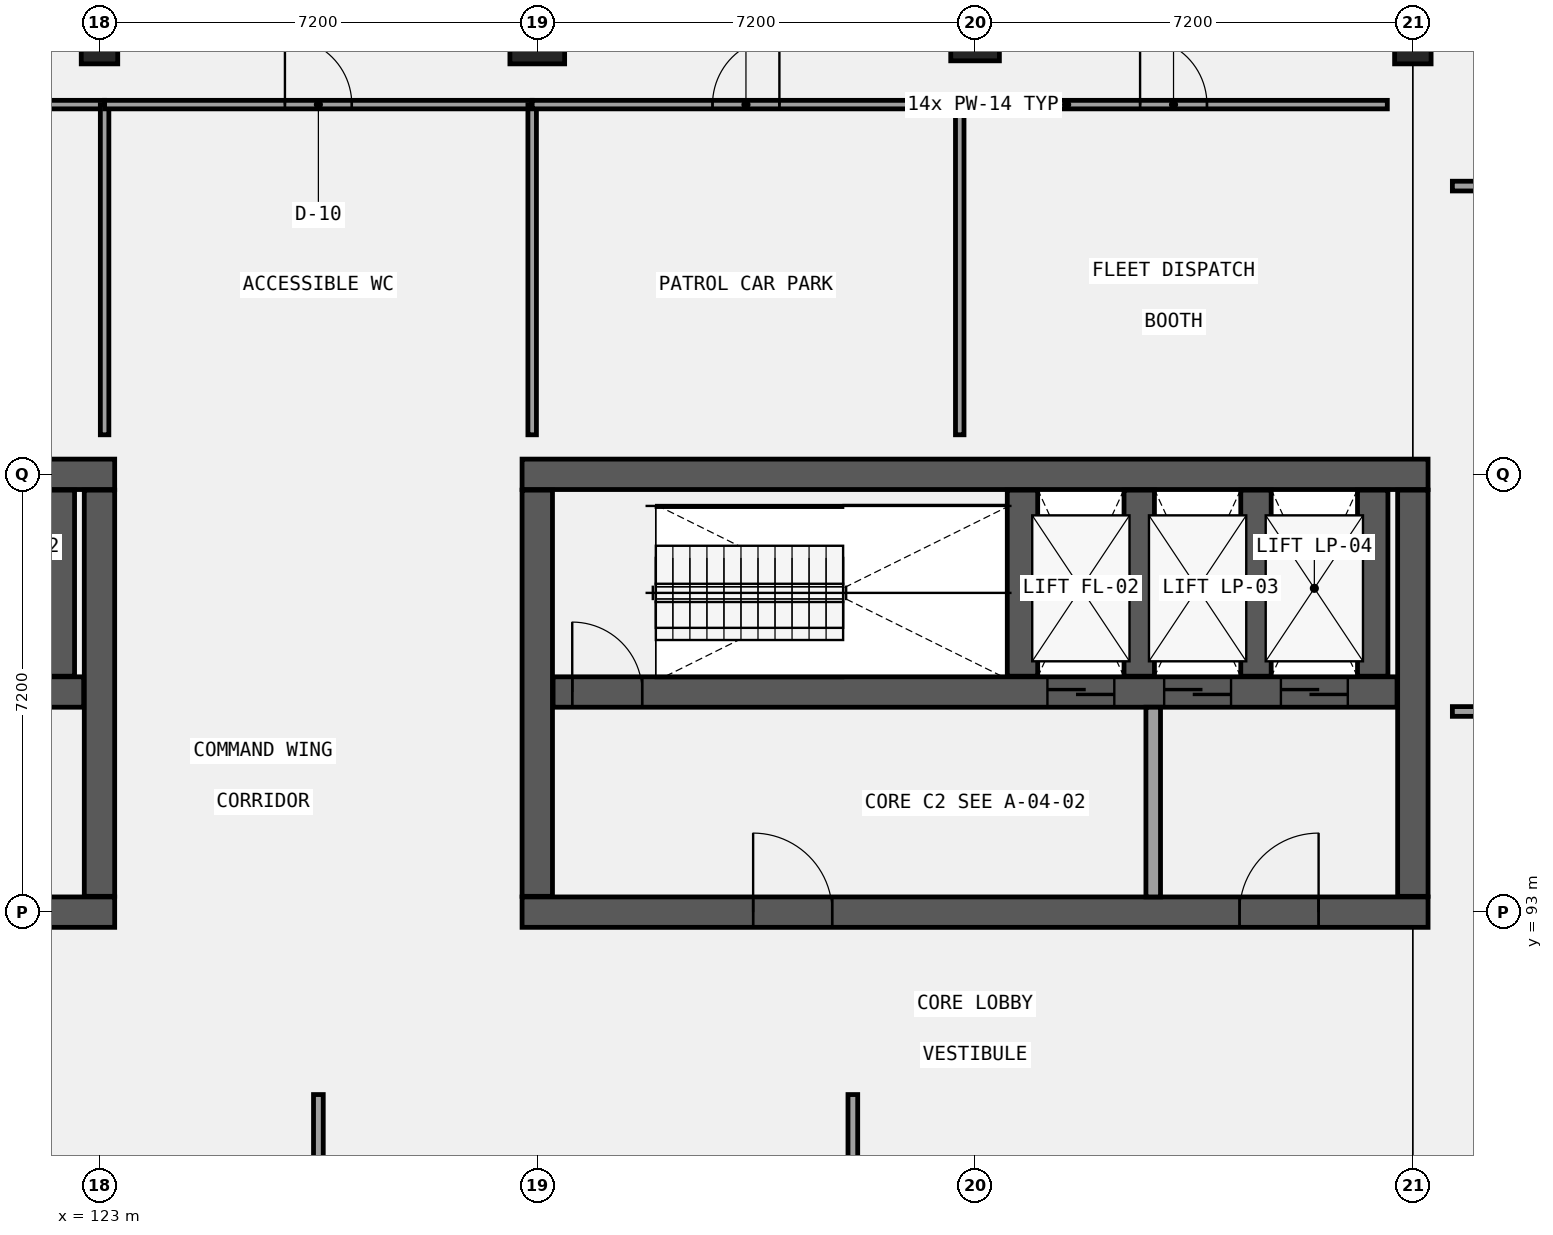
"""IFC4 building model, lengths in metres.
Left out: names, types, materials, properties, quantities, classifications, styles, units other than length and angle.
Written with IfcOpenShell. Run it as: python <this file> out.ifc"""

import sys

from ifc_helpers import new_model, si_unit, direction, frame, frame_2d, origin, origin_2d, place, context, subcontext, project, spatial, rectangle, extrude, element, fill, save


model = new_model("IFC4")
c1 = context("Model", 3, precision=1e-05, world=origin(), true_north=direction((0.0, 1.0)))
c2 = subcontext(c1, "Body", "Model", "MODEL_VIEW")
j1 = project(units=[si_unit("LENGTHUNIT", "METRE"), si_unit("PLANEANGLEUNIT", "RADIAN")], contexts=[c1])
p1 = place(None, origin())
s1 = spatial("IfcSite", under=j1, at=p1, CompositionType="ELEMENT")
p2 = place(p1, origin())
s2 = spatial("IfcBuilding", under=s1, at=p2, CompositionType="ELEMENT")
p3 = place(p2, frame((0.0, 0.0, -4.2)))
s3 = spatial("IfcBuildingStorey", under=s2, at=p3, CompositionType="ELEMENT", Elevation=-4.2)
p4 = place(p3, frame((108.35, 100.2, 0.0), z_axis=(0.0, 0.0, 1.0), x_axis=(1.0, 0.0, 0.0)))
e1 = element("IfcWall", 1, at=p4, inside=s3, PredefinedType="SHEAR", context=c2, shape_type="SweptSolid", body=[
    extrude(rectangle(XDim=14.9, YDim=0.5, at=frame_2d((7.45, 0.0))), origin(), (0.0, 0.0, 1.0), 4.2),
])
p5 = place(p3, frame((108.35, 93.0, 0.0), z_axis=(0.0, 0.0, 1.0), x_axis=(1.0, 0.0, 0.0)))
e2 = element("IfcWall", 2, at=p5, inside=s3, PredefinedType="SHEAR", context=c2, shape_type="SweptSolid", body=[
    extrude(rectangle(XDim=14.9, YDim=0.5, at=frame_2d((7.45, 0.0))), origin(), (0.0, 0.0, 1.0), 4.2),
])
p6 = place(p5, frame((3.8, 0.0, 0.0)))
e3 = element("IfcOpeningElement", 3, at=p6, cuts=e2, PredefinedType="OPENING", context=c2, shape_type="SweptSolid", body=[
    extrude(rectangle(XDim=1.3, YDim=2.2, at=frame_2d((0.65, 1.1))), frame((0.0, 0.26, 0.0), z_axis=(0.0, -1.0, 0.0), x_axis=(1.0, 0.0, 0.0)), (0.0, 0.0, 1.0), 0.52),
])
p7 = place(p5, frame((11.8, 0.0, 0.0)))
e4 = element("IfcOpeningElement", 4, at=p7, cuts=e2, PredefinedType="OPENING", context=c2, shape_type="SweptSolid", body=[
    extrude(rectangle(XDim=1.3, YDim=2.2, at=frame_2d((0.65, 1.1))), frame((0.0, 0.26, 0.0), z_axis=(0.0, -1.0, 0.0), x_axis=(1.0, 0.0, 0.0)), (0.0, 0.0, 1.0), 0.52),
])
p8 = place(p3, frame((123.0, 93.26, 0.0), z_axis=(0.0, 0.0, 1.0), x_axis=(0.0, 1.0, 0.0)))
e5 = element("IfcWall", 5, at=p8, inside=s3, PredefinedType="SHEAR", context=c2, shape_type="SweptSolid", body=[
    extrude(rectangle(XDim=6.68, YDim=0.5, at=frame_2d((3.34, 0.0))), origin(), (0.0, 0.0, 1.0), 4.2),
])
p9 = place(p3, frame((108.86, 96.62, 0.0), z_axis=(0.0, 0.0, 1.0), x_axis=(1.0, 0.0, 0.0)))
e6 = element("IfcWall", 6, at=p9, inside=s3, PredefinedType="SHEAR", context=c2, shape_type="SweptSolid", body=[
    extrude(rectangle(XDim=13.88, YDim=0.5, at=frame_2d((6.94, 0.0))), origin(), (0.0, 0.0, 1.0), 4.2),
])
p10 = place(p9, frame((8.13, 0.0, 0.0)))
e7 = element("IfcOpeningElement", 7, at=p10, cuts=e6, PredefinedType="OPENING", context=c2, shape_type="SweptSolid", body=[
    extrude(rectangle(XDim=1.1, YDim=2.15, at=frame_2d((0.55, 1.075))), frame((0.0, 0.26, 0.0), z_axis=(0.0, -1.0, 0.0), x_axis=(1.0, 0.0, 0.0)), (0.0, 0.0, 1.0), 0.52),
])
p11 = place(p9, frame((10.05, 0.0, 0.0)))
e8 = element("IfcOpeningElement", 8, at=p11, cuts=e6, PredefinedType="OPENING", context=c2, shape_type="SweptSolid", body=[
    extrude(rectangle(XDim=1.1, YDim=2.15, at=frame_2d((0.55, 1.075))), frame((0.0, 0.26, 0.0), z_axis=(0.0, -1.0, 0.0), x_axis=(1.0, 0.0, 0.0)), (0.0, 0.0, 1.0), 0.52),
])
p12 = place(p9, frame((11.97, 0.0, 0.0)))
e9 = element("IfcOpeningElement", 9, at=p12, cuts=e6, PredefinedType="OPENING", context=c2, shape_type="SweptSolid", body=[
    extrude(rectangle(XDim=1.1, YDim=2.15, at=frame_2d((0.55, 1.075))), frame((0.0, 0.26, 0.0), z_axis=(0.0, -1.0, 0.0), x_axis=(1.0, 0.0, 0.0)), (0.0, 0.0, 1.0), 0.52),
])
p13 = place(p9, frame((0.315, 0.0, 0.0)))
e10 = element("IfcOpeningElement", 10, at=p13, cuts=e6, PredefinedType="OPENING", context=c2, shape_type="SweptSolid", body=[
    extrude(rectangle(XDim=1.15, YDim=2.15, at=frame_2d((0.575, 1.075))), frame((0.0, 0.26, 0.0), z_axis=(0.0, -1.0, 0.0), x_axis=(1.0, 0.0, 0.0)), (0.0, 0.0, 1.0), 0.52),
])
p14 = place(p3, frame((122.34, 96.88, 0.0), z_axis=(0.0, 0.0, 1.0), x_axis=(0.0, 1.0, 0.0)))
e11 = element("IfcWall", 11, at=p14, inside=s3, PredefinedType="SHEAR", context=c2, shape_type="SweptSolid", body=[
    extrude(rectangle(XDim=3.06, YDim=0.5, at=frame_2d((1.53, 0.0))), origin(), (0.0, 0.0, 1.0), 4.2),
])
p15 = place(p3, frame((129.95, 100.2, 0.0), z_axis=(0.0, 0.0, 1.0), x_axis=(1.0, 0.0, 0.0)))
e12 = element("IfcWall", 12, at=p15, inside=s3, PredefinedType="SHEAR", context=c2, shape_type="SweptSolid", body=[
    extrude(rectangle(XDim=14.9, YDim=0.5, at=frame_2d((7.45, 0.0))), origin(), (0.0, 0.0, 1.0), 4.2),
])
p16 = place(p3, frame((129.95, 93.0, 0.0), z_axis=(0.0, 0.0, 1.0), x_axis=(1.0, 0.0, 0.0)))
e13 = element("IfcWall", 13, at=p16, inside=s3, PredefinedType="SHEAR", context=c2, shape_type="SweptSolid", body=[
    extrude(rectangle(XDim=14.9, YDim=0.5, at=frame_2d((7.45, 0.0))), origin(), (0.0, 0.0, 1.0), 4.2),
])
p17 = place(p16, frame((3.8, 0.0, 0.0)))
e14 = element("IfcOpeningElement", 14, at=p17, cuts=e13, PredefinedType="OPENING", context=c2, shape_type="SweptSolid", body=[
    extrude(rectangle(XDim=1.3, YDim=2.2, at=frame_2d((0.65, 1.1))), frame((0.0, 0.26, 0.0), z_axis=(0.0, -1.0, 0.0), x_axis=(1.0, 0.0, 0.0)), (0.0, 0.0, 1.0), 0.52),
])
p18 = place(p16, frame((11.8, 0.0, 0.0)))
e15 = element("IfcOpeningElement", 15, at=p18, cuts=e13, PredefinedType="OPENING", context=c2, shape_type="SweptSolid", body=[
    extrude(rectangle(XDim=1.3, YDim=2.2, at=frame_2d((0.65, 1.1))), frame((0.0, 0.26, 0.0), z_axis=(0.0, -1.0, 0.0), x_axis=(1.0, 0.0, 0.0)), (0.0, 0.0, 1.0), 0.52),
])
for number, where, z_axis, x_axis in (
    (16, (130.2, 93.26, 0.0), (0.0, 0.0, 1.0), (0.0, 1.0, 0.0)),
    (17, (144.6, 93.26, 0.0), (0.0, 0.0, 1.0), (0.0, 1.0, 0.0)),
):
    element("IfcWall", number, at=place(p3, frame(where, z_axis=z_axis, x_axis=x_axis)), inside=s3, PredefinedType="SHEAR", context=c2, shape_type="SweptSolid", body=[
        extrude(rectangle(XDim=6.68, YDim=0.5, at=frame_2d((3.34, 0.0))), origin(), (0.0, 0.0, 1.0), 4.2),
    ])
p19 = place(p3, frame((130.46, 96.62, 0.0), z_axis=(0.0, 0.0, 1.0), x_axis=(1.0, 0.0, 0.0)))
e18 = element("IfcWall", 18, at=p19, inside=s3, PredefinedType="SHEAR", context=c2, shape_type="SweptSolid", body=[
    extrude(rectangle(XDim=13.88, YDim=0.5, at=frame_2d((6.94, 0.0))), origin(), (0.0, 0.0, 1.0), 4.2),
])
p20 = place(p19, frame((8.13, 0.0, 0.0)))
e19 = element("IfcOpeningElement", 19, at=p20, cuts=e18, PredefinedType="OPENING", context=c2, shape_type="SweptSolid", body=[
    extrude(rectangle(XDim=1.1, YDim=2.15, at=frame_2d((0.55, 1.075))), frame((0.0, 0.26, 0.0), z_axis=(0.0, -1.0, 0.0), x_axis=(1.0, 0.0, 0.0)), (0.0, 0.0, 1.0), 0.52),
])
p21 = place(p19, frame((10.05, 0.0, 0.0)))
e20 = element("IfcOpeningElement", 20, at=p21, cuts=e18, PredefinedType="OPENING", context=c2, shape_type="SweptSolid", body=[
    extrude(rectangle(XDim=1.1, YDim=2.15, at=frame_2d((0.55, 1.075))), frame((0.0, 0.26, 0.0), z_axis=(0.0, -1.0, 0.0), x_axis=(1.0, 0.0, 0.0)), (0.0, 0.0, 1.0), 0.52),
])
p22 = place(p19, frame((11.97, 0.0, 0.0)))
e21 = element("IfcOpeningElement", 21, at=p22, cuts=e18, PredefinedType="OPENING", context=c2, shape_type="SweptSolid", body=[
    extrude(rectangle(XDim=1.1, YDim=2.15, at=frame_2d((0.55, 1.075))), frame((0.0, 0.26, 0.0), z_axis=(0.0, -1.0, 0.0), x_axis=(1.0, 0.0, 0.0)), (0.0, 0.0, 1.0), 0.52),
])
p23 = place(p19, frame((0.315, 0.0, 0.0)))
e22 = element("IfcOpeningElement", 22, at=p23, cuts=e18, PredefinedType="OPENING", context=c2, shape_type="SweptSolid", body=[
    extrude(rectangle(XDim=1.15, YDim=2.15, at=frame_2d((0.575, 1.075))), frame((0.0, 0.26, 0.0), z_axis=(0.0, -1.0, 0.0), x_axis=(1.0, 0.0, 0.0)), (0.0, 0.0, 1.0), 0.52),
])
for number, where, z_axis, x_axis in (
    (23, (138.18, 96.88, 0.0), (0.0, 0.0, 1.0), (0.0, 1.0, 0.0)),
    (24, (140.1, 96.88, 0.0), (0.0, 0.0, 1.0), (0.0, 1.0, 0.0)),
    (25, (142.02, 96.88, 0.0), (0.0, 0.0, 1.0), (0.0, 1.0, 0.0)),
    (26, (143.94, 96.88, 0.0), (0.0, 0.0, 1.0), (0.0, 1.0, 0.0)),
):
    element("IfcWall", number, at=place(p3, frame(where, z_axis=z_axis, x_axis=x_axis)), inside=s3, PredefinedType="SHEAR", context=c2, shape_type="SweptSolid", body=[
        extrude(rectangle(XDim=3.06, YDim=0.5, at=frame_2d((1.53, 0.0))), origin(), (0.0, 0.0, 1.0), 4.2),
    ])
p24 = place(p3, frame((123.0, 107.4, 0.0), z_axis=(0.0, 0.0, 1.0), x_axis=(1.0, 0.0, 0.0)))
e27 = element("IfcColumn", 27, at=p24, inside=s3, PredefinedType="COLUMN", context=c2, shape_type="SweptSolid", body=[
    extrude(rectangle(XDim=0.6, YDim=0.9, at=origin_2d()), origin(), (0.0, 0.0, 1.0), 4.2),
])
p25 = place(p3, frame((130.2, 107.4, 0.0), z_axis=(0.0, 0.0, 1.0), x_axis=(1.0, 0.0, 0.0)))
e28 = element("IfcColumn", 28, at=p25, inside=s3, PredefinedType="COLUMN", context=c2, shape_type="SweptSolid", body=[
    extrude(rectangle(XDim=0.9, YDim=0.9, at=origin_2d()), origin(), (0.0, 0.0, 1.0), 4.2),
])
p26 = place(p3, frame((137.4, 107.4, 0.0), z_axis=(0.0, 0.0, 1.0), x_axis=(1.0, 0.0, 0.0)))
e29 = element("IfcColumn", 29, at=p26, inside=s3, PredefinedType="COLUMN", context=c2, shape_type="SweptSolid", body=[
    extrude(rectangle(XDim=0.8, YDim=0.8, at=origin_2d()), origin(), (0.0, 0.0, 1.0), 4.2),
])
p27 = place(p3, frame((144.6, 107.4, 0.0), z_axis=(0.0, 0.0, 1.0), x_axis=(1.0, 0.0, 0.0)))
e30 = element("IfcColumn", 30, at=p27, inside=s3, PredefinedType="COLUMN", context=c2, shape_type="SweptSolid", body=[
    extrude(rectangle(XDim=0.6, YDim=0.9, at=origin_2d()), origin(), (0.0, 0.0, 1.0), 4.2),
])
p28 = place(p3, frame((140.33, 93.25, 0.0), z_axis=(0.0, 0.0, 1.0), x_axis=(0.0, 1.0, 0.0)))
e31 = element("IfcWall", 31, at=p28, inside=s3, PredefinedType="SOLIDWALL", context=c2, shape_type="SweptSolid", body=[
    extrude(rectangle(XDim=3.12, YDim=0.24, at=frame_2d((1.56, 0.0))), origin(), (0.0, 0.0, 1.0), 3.85),
])
p29 = place(p3, frame((116.052, 106.28, 0.0), z_axis=(0.0, 0.0, 1.0), x_axis=(1.0, 0.0, 0.0)))
e32 = element("IfcWall", 32, at=p29, inside=s3, PredefinedType="PARTITIONING", context=c2, shape_type="SweptSolid", body=[
    extrude(rectangle(XDim=7.032, YDim=0.14, at=frame_2d((3.516, 0.0))), origin(), (0.0, 0.0, 1.0), 3.88),
])
p30 = place(p29, frame((2.996, 0.0, 0.0)))
e33 = element("IfcOpeningElement", 33, at=p30, cuts=e32, PredefinedType="OPENING", context=c2, shape_type="SweptSolid", body=[
    extrude(rectangle(XDim=1.04, YDim=2.35, at=frame_2d((0.52, 1.175))), frame((0.0, 0.08, 0.0), z_axis=(0.0, -1.0, 0.0), x_axis=(1.0, 0.0, 0.0)), (0.0, 0.0, 1.0), 0.16),
])
p31 = place(p3, frame((123.084, 100.85, 0.0), z_axis=(0.0, 0.0, 1.0), x_axis=(0.0, 1.0, 0.0)))
e34 = element("IfcWall", 34, at=p31, inside=s3, PredefinedType="PARTITIONING", context=c2, shape_type="SweptSolid", body=[
    extrude(rectangle(XDim=5.43, YDim=0.14, at=frame_2d((2.715, 0.0))), origin(), (0.0, 0.0, 1.0), 2.88),
])
p32 = place(p3, frame((123.084, 106.28, 0.0), z_axis=(0.0, 0.0, 1.0), x_axis=(1.0, 0.0, 0.0)))
e35 = element("IfcWall", 35, at=p32, inside=s3, PredefinedType="PARTITIONING", context=c2, shape_type="SweptSolid", body=[
    extrude(rectangle(XDim=7.032, YDim=0.14, at=frame_2d((3.516, 0.0))), origin(), (0.0, 0.0, 1.0), 3.88),
])
p33 = place(p32, frame((2.966, 0.0, 0.0)))
e36 = element("IfcOpeningElement", 36, at=p33, cuts=e35, PredefinedType="OPENING", context=c2, shape_type="SweptSolid", body=[
    extrude(rectangle(XDim=1.1, YDim=2.1, at=frame_2d((0.55, 1.05))), frame((0.0, 0.08, 0.0), z_axis=(0.0, -1.0, 0.0), x_axis=(1.0, 0.0, 0.0)), (0.0, 0.0, 1.0), 0.16),
])
p34 = place(p3, frame((130.116, 100.85, 0.0), z_axis=(0.0, 0.0, 1.0), x_axis=(0.0, 1.0, 0.0)))
e37 = element("IfcWall", 37, at=p34, inside=s3, PredefinedType="PARTITIONING", context=c2, shape_type="SweptSolid", body=[
    extrude(rectangle(XDim=5.43, YDim=0.14, at=frame_2d((2.715, 0.0))), origin(), (0.0, 0.0, 1.0), 3.33),
])
p35 = place(p3, frame((130.116, 106.28, 0.0), z_axis=(0.0, 0.0, 1.0), x_axis=(1.0, 0.0, 0.0)))
e38 = element("IfcWall", 38, at=p35, inside=s3, PredefinedType="PARTITIONING", context=c2, shape_type="SweptSolid", body=[
    extrude(rectangle(XDim=7.032, YDim=0.14, at=frame_2d((3.516, 0.0))), origin(), (0.0, 0.0, 1.0), 3.88),
])
p36 = place(p35, frame((2.966, 0.0, 0.0)))
e39 = element("IfcOpeningElement", 39, at=p36, cuts=e38, PredefinedType="OPENING", context=c2, shape_type="SweptSolid", body=[
    extrude(rectangle(XDim=1.1, YDim=2.22, at=frame_2d((0.55, 1.11))), frame((0.0, 0.08, 0.0), z_axis=(0.0, -1.0, 0.0), x_axis=(1.0, 0.0, 0.0)), (0.0, 0.0, 1.0), 0.16),
])
p37 = place(p3, frame((137.148, 100.85, 0.0), z_axis=(0.0, 0.0, 1.0), x_axis=(0.0, 1.0, 0.0)))
e40 = element("IfcWall", 40, at=p37, inside=s3, PredefinedType="PARTITIONING", context=c2, shape_type="SweptSolid", body=[
    extrude(rectangle(XDim=5.43, YDim=0.14, at=frame_2d((2.715, 0.0))), origin(), (0.0, 0.0, 1.0), 3.28),
])
p38 = place(p3, frame((137.148, 106.28, 0.0), z_axis=(0.0, 0.0, 1.0), x_axis=(1.0, 0.0, 0.0)))
e41 = element("IfcWall", 41, at=p38, inside=s3, PredefinedType="PARTITIONING", context=c2, shape_type="SweptSolid", body=[
    extrude(rectangle(XDim=7.032, YDim=0.14, at=frame_2d((3.516, 0.0))), origin(), (0.0, 0.0, 1.0), 3.88),
])
p39 = place(p38, frame((2.966, 0.0, 0.0)))
e42 = element("IfcOpeningElement", 42, at=p39, cuts=e41, PredefinedType="OPENING", context=c2, shape_type="SweptSolid", body=[
    extrude(rectangle(XDim=1.1, YDim=2.35, at=frame_2d((0.55, 1.175))), frame((0.0, 0.08, 0.0), z_axis=(0.0, -1.0, 0.0), x_axis=(1.0, 0.0, 0.0)), (0.0, 0.0, 1.0), 0.16),
])
for number, where, z_axis, x_axis in (
    (43, (126.6, 83.22, 0.0), (0.0, 0.0, 1.0), (0.0, 1.0, 0.0)),
    (44, (135.39, 83.22, 0.0), (0.0, 0.0, 1.0), (0.0, 1.0, 0.0)),
):
    element("IfcWall", number, at=place(p3, frame(where, z_axis=z_axis, x_axis=x_axis)), inside=s3, PredefinedType="PARTITIONING", context=c2, shape_type="SweptSolid", body=[
        extrude(rectangle(XDim=6.78, YDim=0.16, at=frame_2d((3.39, 0.0))), origin(), (0.0, 0.0, 1.0), 3.88),
    ])
for number, where, z_axis, x_axis in (
    (45, (145.25, 96.3, 0.0), (0.0, 0.0, 1.0), (1.0, 0.0, 0.0)),
    (46, (145.25, 104.94, 0.0), (0.0, 0.0, 1.0), (1.0, 0.0, 0.0)),
):
    element("IfcWall", number, at=place(p3, frame(where, z_axis=z_axis, x_axis=x_axis)), inside=s3, PredefinedType="PARTITIONING", context=c2, shape_type="SweptSolid", body=[
        extrude(rectangle(XDim=13.23, YDim=0.16, at=frame_2d((6.615, 0.0))), origin(), (0.0, 0.0, 1.0), 3.88),
    ])
p40 = place(p20, frame((1.1, 0.0, 0.0), z_axis=(0.0, 0.0, 1.0), x_axis=(-1.0, 0.0, 0.0)))
e47 = element("IfcDoor", 47, at=p40, inside=s3, OperationType="DOUBLE_DOOR_SLIDING", PredefinedType="DOOR", context=c2, shape_type="SweptSolid", body=[
    extrude(rectangle(XDim=1.1, YDim=2.15, at=frame_2d((0.55, 1.075))), frame((0.0, 0.025, 0.0), z_axis=(0.0, -1.0, 0.0), x_axis=(1.0, 0.0, 0.0)), (0.0, 0.0, 1.0), 0.05),
])
fill(e19, e47)
p41 = place(p21, frame((1.1, 0.0, 0.0), z_axis=(0.0, 0.0, 1.0), x_axis=(-1.0, 0.0, 0.0)))
e48 = element("IfcDoor", 48, at=p41, inside=s3, OperationType="DOUBLE_DOOR_SLIDING", PredefinedType="DOOR", context=c2, shape_type="SweptSolid", body=[
    extrude(rectangle(XDim=1.1, YDim=2.15, at=frame_2d((0.55, 1.075))), frame((0.0, 0.025, 0.0), z_axis=(0.0, -1.0, 0.0), x_axis=(1.0, 0.0, 0.0)), (0.0, 0.0, 1.0), 0.05),
])
fill(e20, e48)
p42 = place(p22, frame((1.1, 0.0, 0.0), z_axis=(0.0, 0.0, 1.0), x_axis=(-1.0, 0.0, 0.0)))
e49 = element("IfcDoor", 49, at=p42, inside=s3, OperationType="DOUBLE_DOOR_SLIDING", PredefinedType="DOOR", context=c2, shape_type="SweptSolid", body=[
    extrude(rectangle(XDim=1.1, YDim=2.15, at=frame_2d((0.55, 1.075))), frame((0.0, 0.025, 0.0), z_axis=(0.0, -1.0, 0.0), x_axis=(1.0, 0.0, 0.0)), (0.0, 0.0, 1.0), 0.05),
])
fill(e21, e49)
p43 = place(p23, origin())
e50 = element("IfcDoor", 50, at=p43, inside=s3, OperationType="SINGLE_SWING_LEFT", PredefinedType="DOOR", context=c2, shape_type="SweptSolid", body=[
    extrude(rectangle(XDim=1.15, YDim=2.15, at=frame_2d((0.575, 1.075))), frame((0.0, 0.025, 0.0), z_axis=(0.0, -1.0, 0.0), x_axis=(1.0, 0.0, 0.0)), (0.0, 0.0, 1.0), 0.05),
])
fill(e22, e50)
p44 = place(p17, frame((1.3, 0.0, 0.0), z_axis=(0.0, 0.0, 1.0), x_axis=(-1.0, 0.0, 0.0)))
e51 = element("IfcDoor", 51, at=p44, inside=s3, OperationType="SINGLE_SWING_LEFT", PredefinedType="DOOR", context=c2, shape_type="SweptSolid", body=[
    extrude(rectangle(XDim=1.3, YDim=2.2, at=frame_2d((0.65, 1.1))), frame((0.0, 0.025, 0.0), z_axis=(0.0, -1.0, 0.0), x_axis=(1.0, 0.0, 0.0)), (0.0, 0.0, 1.0), 0.05),
])
fill(e14, e51)
p45 = place(p18, frame((1.3, 0.0, 0.0), z_axis=(0.0, 0.0, 1.0), x_axis=(-1.0, 0.0, 0.0)))
e52 = element("IfcDoor", 52, at=p45, inside=s3, OperationType="SINGLE_SWING_RIGHT", PredefinedType="DOOR", context=c2, shape_type="SweptSolid", body=[
    extrude(rectangle(XDim=1.3, YDim=2.2, at=frame_2d((0.65, 1.1))), frame((0.0, 0.025, 0.0), z_axis=(0.0, -1.0, 0.0), x_axis=(1.0, 0.0, 0.0)), (0.0, 0.0, 1.0), 0.05),
])
fill(e15, e52)
p46 = place(p33, frame((1.1, 0.0, 0.0), z_axis=(0.0, 0.0, 1.0), x_axis=(-1.0, 0.0, 0.0)))
e53 = element("IfcDoor", 53, at=p46, inside=s3, OperationType="SINGLE_SWING_LEFT", PredefinedType="DOOR", context=c2, shape_type="SweptSolid", body=[
    extrude(rectangle(XDim=1.1, YDim=2.1, at=frame_2d((0.55, 1.05))), frame((0.0, 0.025, 0.0), z_axis=(0.0, -1.0, 0.0), x_axis=(1.0, 0.0, 0.0)), (0.0, 0.0, 1.0), 0.05),
])
fill(e36, e53)
p47 = place(p36, frame((1.1, 0.0, 0.0), z_axis=(0.0, 0.0, 1.0), x_axis=(-1.0, 0.0, 0.0)))
e54 = element("IfcDoor", 54, at=p47, inside=s3, OperationType="SINGLE_SWING_RIGHT", PredefinedType="DOOR", context=c2, shape_type="SweptSolid", body=[
    extrude(rectangle(XDim=1.1, YDim=2.22, at=frame_2d((0.55, 1.11))), frame((0.0, 0.025, 0.0), z_axis=(0.0, -1.0, 0.0), x_axis=(1.0, 0.0, 0.0)), (0.0, 0.0, 1.0), 0.05),
])
fill(e39, e54)
p48 = place(p39, frame((1.1, 0.0, 0.0), z_axis=(0.0, 0.0, 1.0), x_axis=(-1.0, 0.0, 0.0)))
e55 = element("IfcDoor", 55, at=p48, inside=s3, OperationType="SINGLE_SWING_LEFT", PredefinedType="DOOR", context=c2, shape_type="SweptSolid", body=[
    extrude(rectangle(XDim=1.1, YDim=2.35, at=frame_2d((0.55, 1.175))), frame((0.0, 0.025, 0.0), z_axis=(0.0, -1.0, 0.0), x_axis=(1.0, 0.0, 0.0)), (0.0, 0.0, 1.0), 0.05),
])
fill(e42, e55)
save(model, sys.argv[1])
